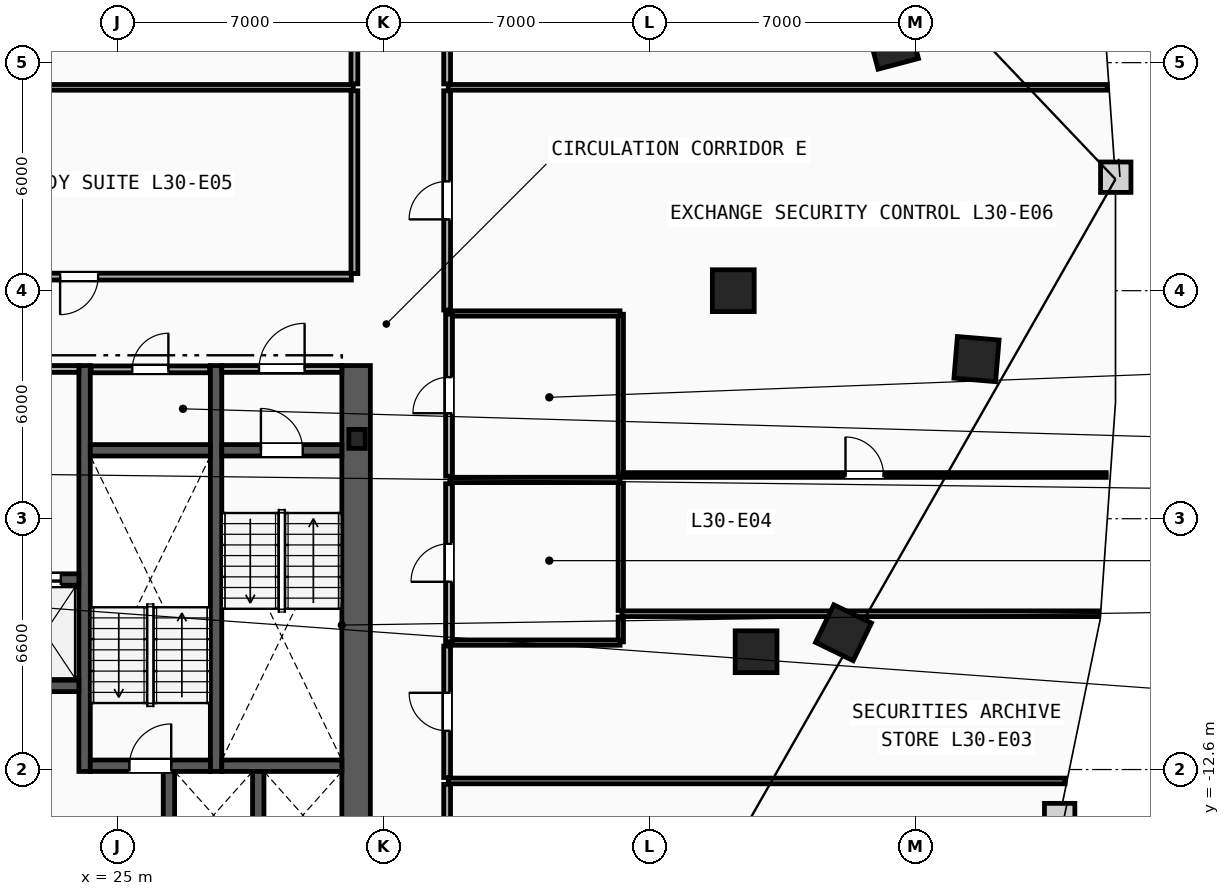
"""IFC4 building model, lengths in metres.
Left out: names, types, materials, properties, quantities, classifications, styles, units other than length and angle.
Written with IfcOpenShell. Run it as: python <this file> out.ifc"""

import sys

from ifc_helpers import new_model, si_unit, direction, frame, frame_2d, origin, origin_2d, place, context, subcontext, project, spatial, rectangle, i_section, extrude, element, fill, save


model = new_model("IFC4")
c1 = context("Model", 3, precision=1e-05, world=origin(), true_north=direction((0.0, 1.0)))
c2 = subcontext(c1, "Body", "Model", "MODEL_VIEW")
j1 = project(units=[si_unit("LENGTHUNIT", "METRE"), si_unit("PLANEANGLEUNIT", "RADIAN")], contexts=[c1])
p1 = place(None, origin())
s1 = spatial("IfcSite", under=j1, at=p1, CompositionType="ELEMENT")
p2 = place(p1, origin())
s2 = spatial("IfcBuilding", under=s1, at=p2, CompositionType="ELEMENT")
p3 = place(p2, frame((0.0, 0.0, 117.8)))
s3 = spatial("IfcBuildingStorey", under=s2, at=p3, CompositionType="ELEMENT", Elevation=117.8)
p4 = place(p3, frame((31.3, -3.9, 0.0), z_axis=(0.0, 0.0, 1.0), x_axis=(1.0, 0.0, 0.0)))
e1 = element("IfcColumn", 1, at=p4, inside=s3, PredefinedType="COLUMN", context=c2, shape_type="SweptSolid", body=[
    extrude(i_section(OverallWidth=0.432, OverallDepth=0.498, WebThickness=0.056, FlangeThickness=0.089, FilletRadius=0.018, at=origin_2d()), origin(), (0.0, 0.0, 1.0), 3.6),
])
for number, where, z_axis, x_axis in (
    (2, (41.2, 0.0, 0.0), (0.0, 0.0, 1.0), (1.0, 0.0, 0.0)),
    (3, (41.8, -9.5, 0.0), (0.0, 0.0, 1.0), (1.0, 0.0, 0.0)),
    (4, (44.1, -9.0, 0.0), (0.0, 0.0, 1.0), (0.437, 0.899, 0.0)),
    (5, (47.6, -1.8, 0.0), (0.0, 0.0, 1.0), (0.084, 0.997, 0.0)),
    (6, (45.4, 6.5, 0.0), (0.0, 0.0, 1.0), (-0.256, 0.967, 0.0)),
):
    element("IfcColumn", number, at=place(p3, frame(where, z_axis=z_axis, x_axis=x_axis)), inside=s3, PredefinedType="COLUMN", context=c2, shape_type="SweptSolid", body=[
        extrude(rectangle(XDim=1.1, YDim=1.1, at=origin_2d()), origin(), (0.0, 0.0, 1.0), 3.6),
    ])
p5 = place(p3, frame((31.275, -15.3, 0.0), z_axis=(0.0, 0.0, 1.0), x_axis=(0.0, 1.0, 0.0)))
e7 = element("IfcWall", 7, at=p5, inside=s3, PredefinedType="SHEAR", context=c2, shape_type="SweptSolid", body=[
    extrude(rectangle(XDim=13.33, YDim=0.75, at=frame_2d((6.665, 0.0))), origin(), (0.0, 0.0, 1.0), 3.3),
])
for number, where, z_axis, x_axis in (
    (8, (27.59, -12.65, 0.0), (0.0, 0.0, 1.0), (0.0, 1.0, 0.0)),
    (9, (24.13, -12.65, 0.0), (0.0, 0.0, 1.0), (0.0, 1.0, 0.0)),
):
    element("IfcWall", number, at=place(p3, frame(where, z_axis=z_axis, x_axis=x_axis)), inside=s3, PredefinedType="SHEAR", context=c2, shape_type="SweptSolid", body=[
        extrude(rectangle(XDim=10.68, YDim=0.3, at=frame_2d((5.34, 0.0))), origin(), (0.0, 0.0, 1.0), 3.3),
    ])
p6 = place(p3, frame((27.74, -4.2, 0.0), z_axis=(0.0, 0.0, 1.0), x_axis=(1.0, 0.0, 0.0)))
e10 = element("IfcWall", 10, at=p6, inside=s3, PredefinedType="SHEAR", context=c2, shape_type="SweptSolid", body=[
    extrude(rectangle(XDim=3.16, YDim=0.3, at=frame_2d((1.58, 0.0))), origin(), (0.0, 0.0, 1.0), 3.3),
])
p7 = place(p6, frame((1.03, 0.0, 0.0)))
e11 = element("IfcOpeningElement", 11, at=p7, cuts=e10, PredefinedType="OPENING", context=c2, shape_type="SweptSolid", body=[
    extrude(rectangle(XDim=1.1, YDim=2.15, at=frame_2d((0.55, 1.075))), frame((0.0, 0.16, 0.0), z_axis=(0.0, -1.0, 0.0), x_axis=(1.0, 0.0, 0.0)), (0.0, 0.0, 1.0), 0.32),
])
p8 = place(p3, frame((27.74, -12.5, 0.0), z_axis=(0.0, 0.0, 1.0), x_axis=(1.0, 0.0, 0.0)))
e12 = element("IfcWall", 12, at=p8, inside=s3, PredefinedType="SHEAR", context=c2, shape_type="SweptSolid", body=[
    extrude(rectangle(XDim=3.16, YDim=0.3, at=frame_2d((1.58, 0.0))), origin(), (0.0, 0.0, 1.0), 3.3),
])
p9 = place(p3, frame((24.28, -12.5, 0.0), z_axis=(0.0, 0.0, 1.0), x_axis=(1.0, 0.0, 0.0)))
e13 = element("IfcWall", 13, at=p9, inside=s3, PredefinedType="SHEAR", context=c2, shape_type="SweptSolid", body=[
    extrude(rectangle(XDim=3.16, YDim=0.3, at=frame_2d((1.58, 0.0))), origin(), (0.0, 0.0, 1.0), 3.3),
])
p10 = place(p9, frame((1.03, 0.0, 0.0)))
e14 = element("IfcOpeningElement", 14, at=p10, cuts=e13, PredefinedType="OPENING", context=c2, shape_type="SweptSolid", body=[
    extrude(rectangle(XDim=1.1, YDim=2.15, at=frame_2d((0.55, 1.075))), frame((0.0, 0.16, 0.0), z_axis=(0.0, -1.0, 0.0), x_axis=(1.0, 0.0, 0.0)), (0.0, 0.0, 1.0), 0.32),
])
p11 = place(p3, frame((24.28, -4.2, 0.0), z_axis=(0.0, 0.0, 1.0), x_axis=(1.0, 0.0, 0.0)))
e15 = element("IfcWall", 15, at=p11, inside=s3, PredefinedType="SHEAR", context=c2, shape_type="SweptSolid", body=[
    extrude(rectangle(XDim=3.16, YDim=0.3, at=frame_2d((1.58, 0.0))), origin(), (0.0, 0.0, 1.0), 3.3),
])
p12 = place(p3, frame((20.98, -2.06, 0.0), z_axis=(0.0, 0.0, 1.0), x_axis=(1.0, 0.0, 0.0)))
e16 = element("IfcWall", 16, at=p12, inside=s3, PredefinedType="PARTITIONING", context=c2, shape_type="SweptSolid", body=[
    extrude(rectangle(XDim=3.0, YDim=0.18, at=frame_2d((1.5, 0.0))), origin(), (0.0, 0.0, 1.0), 3.3),
])
p13 = place(p12, frame((0.9, 0.0, 0.0)))
e17 = element("IfcOpeningElement", 17, at=p13, cuts=e16, PredefinedType="OPENING", context=c2, shape_type="SweptSolid", body=[
    extrude(rectangle(XDim=1.2, YDim=2.15, at=frame_2d((0.6, 1.075))), frame((0.0, 0.1, 0.0), z_axis=(0.0, -1.0, 0.0), x_axis=(1.0, 0.0, 0.0)), (0.0, 0.0, 1.0), 0.2),
])
p14 = place(p3, frame((27.74, -2.06, 0.0), z_axis=(0.0, 0.0, 1.0), x_axis=(1.0, 0.0, 0.0)))
e18 = element("IfcWall", 18, at=p14, inside=s3, PredefinedType="PARTITIONING", context=c2, shape_type="SweptSolid", body=[
    extrude(rectangle(XDim=3.16, YDim=0.18, at=frame_2d((1.58, 0.0))), origin(), (0.0, 0.0, 1.0), 3.3),
])
p15 = place(p14, frame((0.98, 0.0, 0.0)))
e19 = element("IfcOpeningElement", 19, at=p15, cuts=e18, PredefinedType="OPENING", context=c2, shape_type="SweptSolid", body=[
    extrude(rectangle(XDim=1.2, YDim=2.15, at=frame_2d((0.6, 1.075))), frame((0.0, 0.1, 0.0), z_axis=(0.0, -1.0, 0.0), x_axis=(1.0, 0.0, 0.0)), (0.0, 0.0, 1.0), 0.2),
])
p16 = place(p3, frame((21.88, -7.6, 0.0), z_axis=(0.0, 0.0, 1.0), x_axis=(1.0, 0.0, 0.0)))
e20 = element("IfcWall", 20, at=p16, inside=s3, PredefinedType="SHEAR", context=c2, shape_type="SweptSolid", body=[
    extrude(rectangle(XDim=2.1, YDim=0.3, at=frame_2d((1.05, 0.0))), origin(), (0.0, 0.0, 1.0), 3.3),
])
p17 = place(p16, frame((0.475, 0.0, 0.0)))
e21 = element("IfcOpeningElement", 21, at=p17, cuts=e20, PredefinedType="OPENING", context=c2, shape_type="SweptSolid", body=[
    extrude(rectangle(XDim=1.15, YDim=2.2, at=frame_2d((0.575, 1.1))), frame((0.0, 0.16, 0.0), z_axis=(0.0, -1.0, 0.0), x_axis=(1.0, 0.0, 0.0)), (0.0, 0.0, 1.0), 0.32),
])
p18 = place(p3, frame((21.88, -10.4, 0.0), z_axis=(0.0, 0.0, 1.0), x_axis=(1.0, 0.0, 0.0)))
e22 = element("IfcWall", 22, at=p18, inside=s3, PredefinedType="SHEAR", context=c2, shape_type="SweptSolid", body=[
    extrude(rectangle(XDim=2.1, YDim=0.3, at=frame_2d((1.05, 0.0))), origin(), (0.0, 0.0, 1.0), 3.3),
])
for number, where, z_axis, x_axis in (
    (23, (28.7, -14.95, 0.0), (0.0, 0.0, 1.0), (0.0, 1.0, 0.0)),
    (24, (26.35, -14.95, 0.0), (0.0, 0.0, 1.0), (0.0, 1.0, 0.0)),
):
    element("IfcWall", number, at=place(p3, frame(where, z_axis=z_axis, x_axis=x_axis)), inside=s3, PredefinedType="SHEAR", context=c2, shape_type="SweptSolid", body=[
        extrude(rectangle(XDim=2.3, YDim=0.3, at=frame_2d((1.15, 0.0))), origin(), (0.0, 0.0, 1.0), 3.3),
    ])
p19 = place(p3, frame((24.3, -2.07, 0.0), z_axis=(0.0, 0.0, 1.0), x_axis=(1.0, 0.0, 0.0)))
e25 = element("IfcWall", 25, at=p19, inside=s3, PredefinedType="PARTITIONING", context=c2, shape_type="SweptSolid", body=[
    extrude(rectangle(XDim=3.12, YDim=0.18, at=frame_2d((1.56, 0.0))), origin(), (0.0, 0.0, 1.0), 3.3),
])
p20 = place(p19, frame((1.085, 0.0, 0.0)))
e26 = element("IfcOpeningElement", 26, at=p20, cuts=e25, PredefinedType="OPENING", context=c2, shape_type="SweptSolid", body=[
    extrude(rectangle(XDim=0.95, YDim=2.1, at=frame_2d((0.475, 1.05))), frame((0.0, 0.1, 0.0), z_axis=(0.0, -1.0, 0.0), x_axis=(1.0, 0.0, 0.0)), (0.0, 0.0, 1.0), 0.2),
])
p21 = place(p3, frame((38.24, -9.24, 0.0), z_axis=(0.0, 0.0, 1.0), x_axis=(0.0, 1.0, 0.0)))
e27 = element("IfcWall", 27, at=p21, inside=s3, PredefinedType="PARTITIONING", context=c2, shape_type="SweptSolid", body=[
    extrude(rectangle(XDim=0.655, YDim=0.14, at=frame_2d((0.328, 0.0))), origin(), (0.0, 0.0, 1.0), 3.3),
])
p22 = place(p3, frame((38.24, -8.415, 0.0), z_axis=(0.0, 0.0, 1.0), x_axis=(0.0, 1.0, 0.0)))
e28 = element("IfcWall", 28, at=p22, inside=s3, PredefinedType="PARTITIONING", context=c2, shape_type="SweptSolid", body=[
    extrude(rectangle(XDim=3.35, YDim=0.14, at=frame_2d((1.675, 0.0))), origin(), (0.0, 0.0, 1.0), 3.3),
])
p23 = place(p3, frame((38.24, -4.895, 0.0), z_axis=(0.0, 0.0, 1.0), x_axis=(0.0, 1.0, 0.0)))
e29 = element("IfcWall", 29, at=p23, inside=s3, PredefinedType="PARTITIONING", context=c2, shape_type="SweptSolid", body=[
    extrude(rectangle(XDim=4.275, YDim=0.14, at=frame_2d((2.137, 0.0))), origin(), (0.0, 0.0, 1.0), 3.3),
])
for number, where, z_axis, x_axis in (
    (30, (33.74, -0.6, 0.0), (0.0, 0.0, 1.0), (1.0, 0.0, 0.0)),
    (31, (33.74, -4.98, 0.0), (0.0, 0.0, 1.0), (1.0, 0.0, 0.0)),
    (32, (33.74, -9.26, 0.0), (0.0, 0.0, 1.0), (1.0, 0.0, 0.0)),
):
    element("IfcWall", number, at=place(p3, frame(where, z_axis=z_axis, x_axis=x_axis)), inside=s3, PredefinedType="PARTITIONING", context=c2, shape_type="SweptSolid", body=[
        extrude(rectangle(XDim=4.48, YDim=0.14, at=frame_2d((2.24, 0.0))), origin(), (0.0, 0.0, 1.0), 3.3),
    ])
p24 = place(p3, frame((33.72, -4.88, 0.0), z_axis=(0.0, 0.0, 1.0), x_axis=(0.0, 1.0, 0.0)))
e33 = element("IfcWall", 33, at=p24, inside=s3, PredefinedType="PARTITIONING", context=c2, shape_type="SweptSolid", body=[
    extrude(rectangle(XDim=4.26, YDim=0.18, at=frame_2d((2.13, 0.0))), origin(), (0.0, 0.0, 1.0), 3.3),
])
p25 = place(p24, frame((1.655, 0.0, 0.0)))
e34 = element("IfcOpeningElement", 34, at=p25, cuts=e33, PredefinedType="OPENING", context=c2, shape_type="SweptSolid", body=[
    extrude(rectangle(XDim=0.95, YDim=2.1, at=frame_2d((0.475, 1.05))), frame((0.0, 0.1, 0.0), z_axis=(0.0, -1.0, 0.0), x_axis=(1.0, 0.0, 0.0)), (0.0, 0.0, 1.0), 0.2),
])
p26 = place(p3, frame((33.72, -9.24, 0.0), z_axis=(0.0, 0.0, 1.0), x_axis=(0.0, 1.0, 0.0)))
e35 = element("IfcWall", 35, at=p26, inside=s3, PredefinedType="PARTITIONING", context=c2, shape_type="SweptSolid", body=[
    extrude(rectangle(XDim=4.16, YDim=0.18, at=frame_2d((2.08, 0.0))), origin(), (0.0, 0.0, 1.0), 3.3),
])
p27 = place(p26, frame((1.58, 0.0, 0.0)))
e36 = element("IfcOpeningElement", 36, at=p27, cuts=e35, PredefinedType="OPENING", context=c2, shape_type="SweptSolid", body=[
    extrude(rectangle(XDim=1.0, YDim=2.15, at=frame_2d((0.5, 1.075))), frame((0.0, 0.1, 0.0), z_axis=(0.0, -1.0, 0.0), x_axis=(1.0, 0.0, 0.0)), (0.0, 0.0, 1.0), 0.2),
])
p28 = place(p3, frame((12.962, 5.35, 0.0), z_axis=(0.0, 0.0, 1.0), x_axis=(1.0, 0.0, 0.0)))
e37 = element("IfcWall", 37, at=p28, inside=s3, PredefinedType="PARTITIONING", context=c2, shape_type="SweptSolid", body=[
    extrude(rectangle(XDim=18.238, YDim=0.15, at=frame_2d((9.119, 0.0))), origin(), (0.0, 0.0, 1.0), 3.3),
])
p29 = place(p3, frame((33.7, 5.35, 0.0), z_axis=(0.0, 0.0, 1.0), x_axis=(1.0, 0.0, 0.0)))
e38 = element("IfcWall", 38, at=p29, inside=s3, PredefinedType="PARTITIONING", context=c2, shape_type="SweptSolid", body=[
    extrude(rectangle(XDim=17.338, YDim=0.15, at=frame_2d((8.669, 0.0))), origin(), (0.0, 0.0, 1.0), 3.3),
])
p30 = place(p3, frame((38.27, -8.5, 0.0), z_axis=(0.0, 0.0, 1.0), x_axis=(1.0, 0.0, 0.0)))
e39 = element("IfcWall", 39, at=p30, inside=s3, PredefinedType="PARTITIONING", context=c2, shape_type="SweptSolid", body=[
    extrude(rectangle(XDim=12.546, YDim=0.15, at=frame_2d((6.273, 0.0))), origin(), (0.0, 0.0, 1.0), 3.3),
])
p31 = place(p3, frame((33.7, -12.9, 0.0), z_axis=(0.0, 0.0, 1.0), x_axis=(1.0, 0.0, 0.0)))
e40 = element("IfcWall", 40, at=p31, inside=s3, PredefinedType="PARTITIONING", context=c2, shape_type="SweptSolid", body=[
    extrude(rectangle(XDim=16.231, YDim=0.15, at=frame_2d((8.115, 0.0))), origin(), (0.0, 0.0, 1.0), 3.3),
])
p32 = place(p3, frame((33.67, -17.428, 0.0), z_axis=(0.0, 0.0, 1.0), x_axis=(0.0, 1.0, 0.0)))
e41 = element("IfcWall", 41, at=p32, inside=s3, PredefinedType="PARTITIONING", context=c2, shape_type="SweptSolid", body=[
    extrude(rectangle(XDim=4.438, YDim=0.18, at=frame_2d((2.219, 0.0))), origin(), (0.0, 0.0, 1.0), 3.3),
])
p33 = place(p32, frame((1.719, 0.0, 0.0)))
e42 = element("IfcOpeningElement", 42, at=p33, cuts=e41, PredefinedType="OPENING", context=c2, shape_type="SweptSolid", body=[
    extrude(rectangle(XDim=1.0, YDim=2.15, at=frame_2d((0.5, 1.075))), frame((0.0, 0.1, 0.0), z_axis=(0.0, -1.0, 0.0), x_axis=(1.0, 0.0, 0.0)), (0.0, 0.0, 1.0), 0.2),
])
p34 = place(p3, frame((33.67, -12.81, 0.0), z_axis=(0.0, 0.0, 1.0), x_axis=(0.0, 1.0, 0.0)))
e43 = element("IfcWall", 43, at=p34, inside=s3, PredefinedType="PARTITIONING", context=c2, shape_type="SweptSolid", body=[
    extrude(rectangle(XDim=3.459, YDim=0.18, at=frame_2d((1.729, 0.0))), origin(), (0.0, 0.0, 1.0), 3.3),
])
p35 = place(p34, frame((1.229, 0.0, 0.0)))
e44 = element("IfcOpeningElement", 44, at=p35, cuts=e43, PredefinedType="OPENING", context=c2, shape_type="SweptSolid", body=[
    extrude(rectangle(XDim=1.0, YDim=2.15, at=frame_2d((0.5, 1.075))), frame((0.0, 0.1, 0.0), z_axis=(0.0, -1.0, 0.0), x_axis=(1.0, 0.0, 0.0)), (0.0, 0.0, 1.0), 0.2),
])
p36 = place(p3, frame((31.15, 0.37, 0.0), z_axis=(0.0, 0.0, 1.0), x_axis=(-1.0, 0.0, 0.0)))
e45 = element("IfcWall", 45, at=p36, inside=s3, PredefinedType="PARTITIONING", context=c2, shape_type="SweptSolid", body=[
    extrude(rectangle(XDim=14.328, YDim=0.18, at=frame_2d((7.164, 0.0))), origin(), (0.0, 0.0, 1.0), 3.3),
])
p37 = place(p36, frame((6.664, 0.0, 0.0)))
e46 = element("IfcOpeningElement", 46, at=p37, cuts=e45, PredefinedType="OPENING", context=c2, shape_type="SweptSolid", body=[
    extrude(rectangle(XDim=1.0, YDim=2.15, at=frame_2d((0.5, 1.075))), frame((0.0, 0.1, 0.0), z_axis=(0.0, -1.0, 0.0), x_axis=(1.0, 0.0, 0.0)), (0.0, 0.0, 1.0), 0.2),
])
p38 = place(p3, frame((31.23, 5.26, 0.0), z_axis=(0.0, 0.0, 1.0), x_axis=(0.0, -1.0, 0.0)))
e47 = element("IfcWall", 47, at=p38, inside=s3, PredefinedType="PARTITIONING", context=c2, shape_type="SweptSolid", body=[
    extrude(rectangle(XDim=4.81, YDim=0.18, at=frame_2d((2.405, 0.0))), origin(), (0.0, 0.0, 1.0), 3.3),
])
p39 = place(p3, frame((33.67, -0.509, 0.0), z_axis=(0.0, 0.0, 1.0), x_axis=(0.0, 1.0, 0.0)))
e48 = element("IfcWall", 48, at=p39, inside=s3, PredefinedType="PARTITIONING", context=c2, shape_type="SweptSolid", body=[
    extrude(rectangle(XDim=5.769, YDim=0.18, at=frame_2d((2.884, 0.0))), origin(), (0.0, 0.0, 1.0), 3.3),
])
p40 = place(p39, frame((2.384, 0.0, 0.0)))
e49 = element("IfcOpeningElement", 49, at=p40, cuts=e48, PredefinedType="OPENING", context=c2, shape_type="SweptSolid", body=[
    extrude(rectangle(XDim=1.0, YDim=2.15, at=frame_2d((0.5, 1.075))), frame((0.0, 0.1, 0.0), z_axis=(0.0, -1.0, 0.0), x_axis=(1.0, 0.0, 0.0)), (0.0, 0.0, 1.0), 0.2),
])
for number, where, z_axis, x_axis in (
    (50, (33.67, 5.44, 0.0), (0.0, 0.0, 1.0), (0.0, 1.0, 0.0)),
    (51, (31.23, 11.4, 0.0), (0.0, 0.0, 1.0), (0.0, -1.0, 0.0)),
):
    element("IfcWall", number, at=place(p3, frame(where, z_axis=z_axis, x_axis=x_axis)), inside=s3, PredefinedType="PARTITIONING", context=c2, shape_type="SweptSolid", body=[
        extrude(rectangle(XDim=5.96, YDim=0.18, at=frame_2d((2.98, 0.0))), origin(), (0.0, 0.0, 1.0), 3.3),
    ])
p41 = place(p3, frame((38.292, -4.85, 0.0), z_axis=(0.0, 0.0, 1.0), x_axis=(1.0, 0.0, 0.0)))
e52 = element("IfcWall", 52, at=p41, inside=s3, PredefinedType="PARTITIONING", context=c2, shape_type="SweptSolid", body=[
    extrude(rectangle(XDim=12.723, YDim=0.125, at=frame_2d((6.361, 0.0))), origin(), (0.0, 0.0, 1.0), 3.3),
])
p42 = place(p41, frame((5.861, 0.0, 0.0)))
e53 = element("IfcOpeningElement", 53, at=p42, cuts=e52, PredefinedType="OPENING", context=c2, shape_type="SweptSolid", body=[
    extrude(rectangle(XDim=1.0, YDim=2.15, at=frame_2d((0.5, 1.075))), frame((0.0, 0.073, 0.0), z_axis=(0.0, -1.0, 0.0), x_axis=(1.0, 0.0, 0.0)), (0.0, 0.0, 1.0), 0.145),
])
p43 = place(p7, origin())
e54 = element("IfcDoor", 54, at=p43, inside=s3, OperationType="SINGLE_SWING_LEFT", PredefinedType="DOOR", context=c2, shape_type="SweptSolid", body=[
    extrude(rectangle(XDim=1.1, YDim=2.15, at=frame_2d((0.55, 1.075))), frame((0.0, 0.025, 0.0), z_axis=(0.0, -1.0, 0.0), x_axis=(1.0, 0.0, 0.0)), (0.0, 0.0, 1.0), 0.05),
])
fill(e11, e54)
p44 = place(p10, origin())
e55 = element("IfcDoor", 55, at=p44, inside=s3, OperationType="SINGLE_SWING_RIGHT", PredefinedType="DOOR", context=c2, shape_type="SweptSolid", body=[
    extrude(rectangle(XDim=1.1, YDim=2.15, at=frame_2d((0.55, 1.075))), frame((0.0, 0.025, 0.0), z_axis=(0.0, -1.0, 0.0), x_axis=(1.0, 0.0, 0.0)), (0.0, 0.0, 1.0), 0.05),
])
fill(e14, e55)
p45 = place(p15, origin())
e56 = element("IfcDoor", 56, at=p45, inside=s3, OperationType="SINGLE_SWING_RIGHT", PredefinedType="DOOR", context=c2, shape_type="SweptSolid", body=[
    extrude(rectangle(XDim=1.2, YDim=2.15, at=frame_2d((0.6, 1.075))), frame((0.0, 0.025, 0.0), z_axis=(0.0, -1.0, 0.0), x_axis=(1.0, 0.0, 0.0)), (0.0, 0.0, 1.0), 0.05),
])
fill(e19, e56)
p46 = place(p17, origin())
e57 = element("IfcDoor", 57, at=p46, inside=s3, OperationType="SLIDING_TO_LEFT", PredefinedType="TRAPDOOR", context=c2, shape_type="SweptSolid", body=[
    extrude(rectangle(XDim=1.15, YDim=2.2, at=frame_2d((0.575, 1.1))), frame((0.0, 0.025, 0.0), z_axis=(0.0, -1.0, 0.0), x_axis=(1.0, 0.0, 0.0)), (0.0, 0.0, 1.0), 0.05),
])
fill(e21, e57)
p47 = place(p37, origin())
e58 = element("IfcDoor", 58, at=p47, inside=s3, OperationType="SINGLE_SWING_RIGHT", PredefinedType="DOOR", context=c2, shape_type="SweptSolid", body=[
    extrude(rectangle(XDim=1.0, YDim=2.15, at=frame_2d((0.5, 1.075))), frame((0.0, 0.025, 0.0), z_axis=(0.0, -1.0, 0.0), x_axis=(1.0, 0.0, 0.0)), (0.0, 0.0, 1.0), 0.05),
])
fill(e46, e58)
p48 = place(p42, origin())
e59 = element("IfcDoor", 59, at=p48, inside=s3, OperationType="SINGLE_SWING_LEFT", PredefinedType="DOOR", context=c2, shape_type="SweptSolid", body=[
    extrude(rectangle(XDim=1.0, YDim=2.15, at=frame_2d((0.5, 1.075))), frame((0.0, 0.025, 0.0), z_axis=(0.0, -1.0, 0.0), x_axis=(1.0, 0.0, 0.0)), (0.0, 0.0, 1.0), 0.05),
])
fill(e53, e59)
p49 = place(p40, origin())
e60 = element("IfcDoor", 60, at=p49, inside=s3, OperationType="SINGLE_SWING_LEFT", PredefinedType="DOOR", context=c2, shape_type="SweptSolid", body=[
    extrude(rectangle(XDim=1.0, YDim=2.15, at=frame_2d((0.5, 1.075))), frame((0.0, 0.025, 0.0), z_axis=(0.0, -1.0, 0.0), x_axis=(1.0, 0.0, 0.0)), (0.0, 0.0, 1.0), 0.05),
])
fill(e49, e60)
p50 = place(p25, origin())
e61 = element("IfcDoor", 61, at=p50, inside=s3, OperationType="SINGLE_SWING_LEFT", PredefinedType="DOOR", context=c2, shape_type="SweptSolid", body=[
    extrude(rectangle(XDim=0.95, YDim=2.1, at=frame_2d((0.475, 1.05))), frame((0.0, 0.025, 0.0), z_axis=(0.0, -1.0, 0.0), x_axis=(1.0, 0.0, 0.0)), (0.0, 0.0, 1.0), 0.05),
])
fill(e34, e61)
p51 = place(p27, origin())
e62 = element("IfcDoor", 62, at=p51, inside=s3, OperationType="SINGLE_SWING_LEFT", PredefinedType="DOOR", context=c2, shape_type="SweptSolid", body=[
    extrude(rectangle(XDim=1.0, YDim=2.15, at=frame_2d((0.5, 1.075))), frame((0.0, 0.025, 0.0), z_axis=(0.0, -1.0, 0.0), x_axis=(1.0, 0.0, 0.0)), (0.0, 0.0, 1.0), 0.05),
])
fill(e36, e62)
p52 = place(p35, origin())
e63 = element("IfcDoor", 63, at=p52, inside=s3, OperationType="SINGLE_SWING_RIGHT", PredefinedType="DOOR", context=c2, shape_type="SweptSolid", body=[
    extrude(rectangle(XDim=1.0, YDim=2.15, at=frame_2d((0.5, 1.075))), frame((0.0, 0.025, 0.0), z_axis=(0.0, -1.0, 0.0), x_axis=(1.0, 0.0, 0.0)), (0.0, 0.0, 1.0), 0.05),
])
fill(e44, e63)
p53 = place(p20, origin())
e64 = element("IfcDoor", 64, at=p53, inside=s3, OperationType="SINGLE_SWING_RIGHT", PredefinedType="DOOR", context=c2, shape_type="SweptSolid", body=[
    extrude(rectangle(XDim=0.95, YDim=2.1, at=frame_2d((0.475, 1.05))), frame((0.0, 0.025, 0.0), z_axis=(0.0, -1.0, 0.0), x_axis=(1.0, 0.0, 0.0)), (0.0, 0.0, 1.0), 0.05),
])
fill(e26, e64)
save(model, sys.argv[1])
